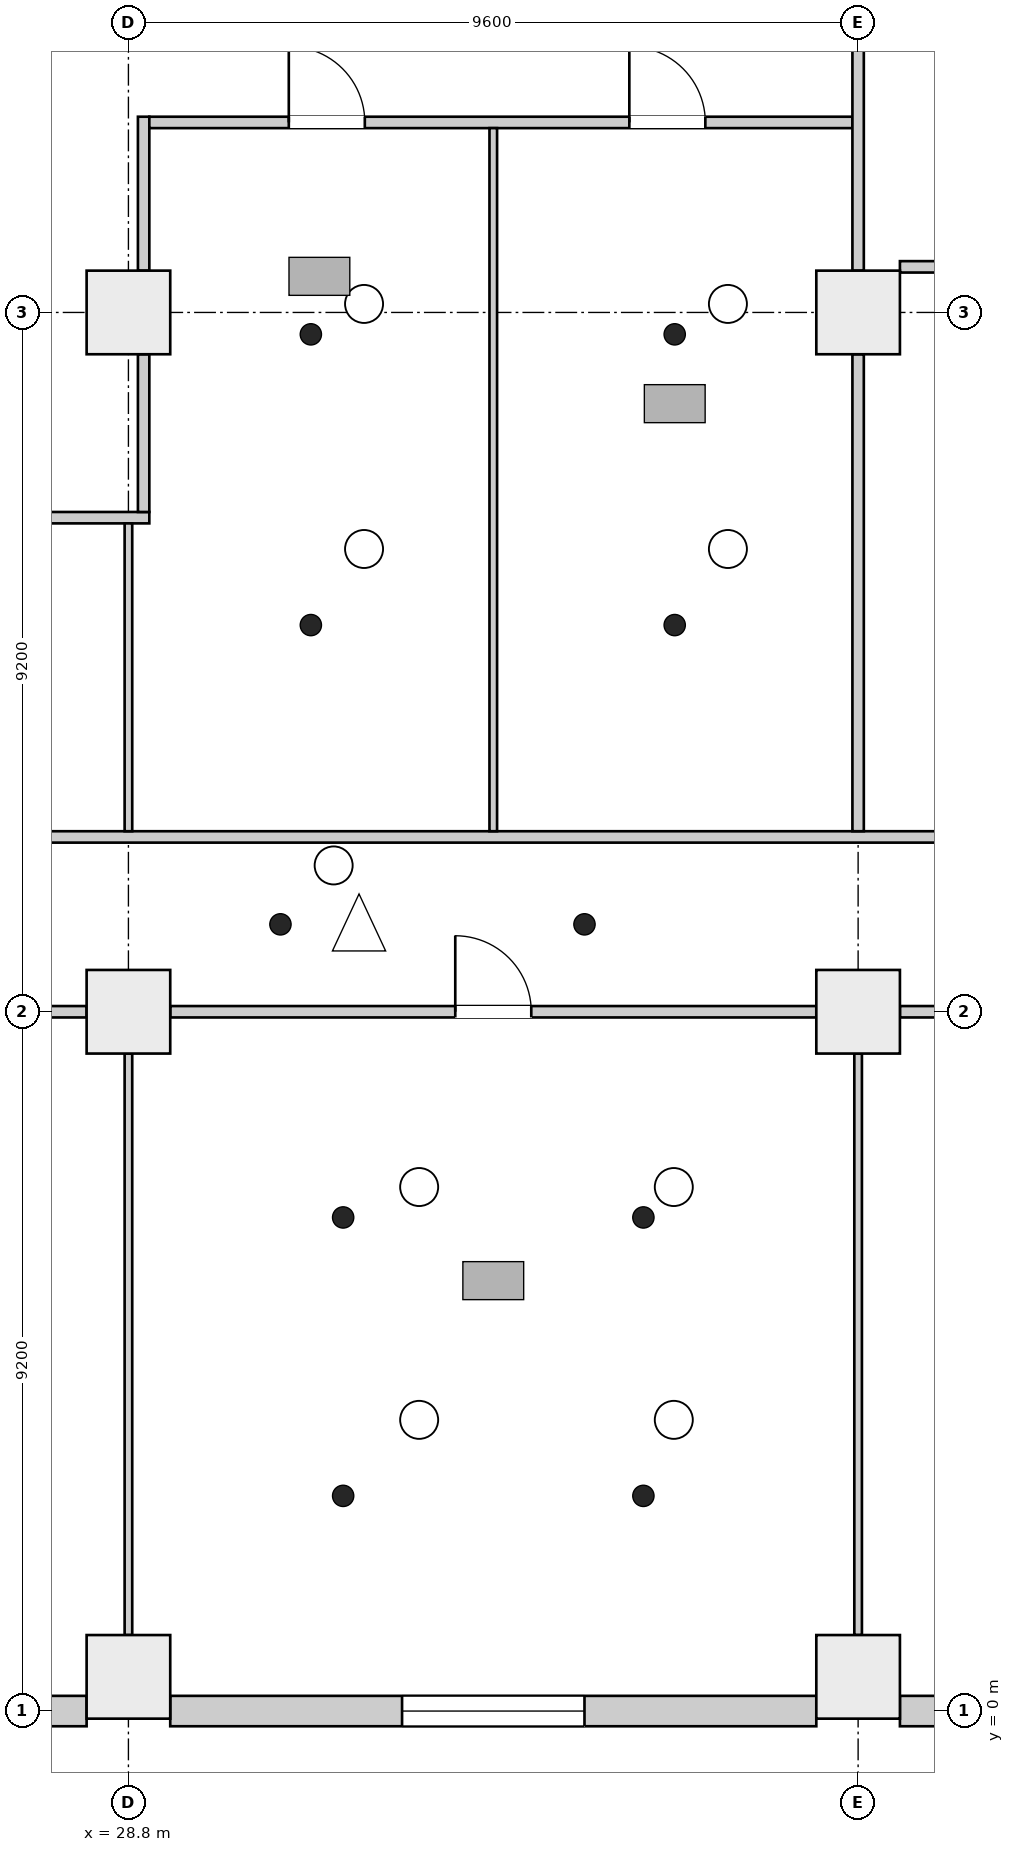
"""IFC4 building model, lengths in metres.
Left out: names, types, materials, properties, quantities, classifications, styles, units other than length and angle.
Written with IfcOpenShell. Run it as: python <this file> out.ifc"""

import sys

from ifc_helpers import new_model, si_unit, direction, frame, frame_2d, origin, origin_2d, place, context, subcontext, project, spatial, rectangle, extrude, element, fill, save


model = new_model("IFC4")
c1 = context("Model", 3, precision=1e-05, world=origin(), true_north=direction((0.0, 1.0)))
c2 = subcontext(c1, "Body", "Model", "MODEL_VIEW")
j1 = project(units=[si_unit("LENGTHUNIT", "METRE"), si_unit("PLANEANGLEUNIT", "RADIAN")], contexts=[c1])
p1 = place(None, origin())
s1 = spatial("IfcSite", under=j1, at=p1, CompositionType="ELEMENT")
p2 = place(p1, origin())
s2 = spatial("IfcBuilding", under=s1, at=p2, CompositionType="ELEMENT")
p3 = place(p2, frame((0.0, 0.0, 26.7)))
s3 = spatial("IfcBuildingStorey", under=s2, at=p3, CompositionType="ELEMENT", Elevation=26.7)
for number, where, z_axis, x_axis in (
    (1, (28.8, 0.45, 0.0), (0.0, 0.0, 1.0), (1.0, 0.0, 0.0)),
    (2, (38.4, 0.45, 0.0), (0.0, 0.0, 1.0), (1.0, 0.0, 0.0)),
    (3, (28.8, 9.2, 0.0), (0.0, 0.0, 1.0), (1.0, 0.0, 0.0)),
    (4, (38.4, 9.2, 0.0), (0.0, 0.0, 1.0), (1.0, 0.0, 0.0)),
    (5, (28.8, 18.4, 0.0), (0.0, 0.0, 1.0), (1.0, 0.0, 0.0)),
    (6, (38.4, 18.4, 0.0), (0.0, 0.0, 1.0), (1.0, 0.0, 0.0)),
):
    element("IfcColumn", number, at=place(p3, frame(where, z_axis=z_axis, x_axis=x_axis)), inside=s3, PredefinedType="COLUMN", context=c2, shape_type="SweptSolid", body=[
        extrude(rectangle(XDim=1.1, YDim=1.1, at=origin_2d()), origin(), (0.0, 0.0, 1.0), 5.2),
    ])
p4 = place(p3, frame((19.75, 0.0, 0.0), z_axis=(0.0, 0.0, 1.0), x_axis=(1.0, 0.0, 0.0)))
e7 = element("IfcWall", 7, at=p4, inside=s3, PredefinedType="ELEMENTEDWALL", context=c2, shape_type="SweptSolid", body=[
    extrude(rectangle(XDim=8.5, YDim=0.4, at=frame_2d((4.25, 0.0))), origin(), (0.0, 0.0, 1.0), 4.85),
])
p5 = place(p4, frame((3.05, 0.0, 1.0)))
e8 = element("IfcOpeningElement", 8, at=p5, cuts=e7, PredefinedType="OPENING", context=c2, shape_type="SweptSolid", body=[
    extrude(rectangle(XDim=2.4, YDim=2.2, at=frame_2d((1.2, 1.1))), frame((0.0, 0.21, 0.0), z_axis=(0.0, -1.0, 0.0), x_axis=(1.0, 0.0, 0.0)), (0.0, 0.0, 1.0), 0.42),
])
p6 = place(p3, frame((29.35, 0.0, 0.0), z_axis=(0.0, 0.0, 1.0), x_axis=(1.0, 0.0, 0.0)))
e9 = element("IfcWall", 9, at=p6, inside=s3, PredefinedType="ELEMENTEDWALL", context=c2, shape_type="SweptSolid", body=[
    extrude(rectangle(XDim=8.5, YDim=0.4, at=frame_2d((4.25, 0.0))), origin(), (0.0, 0.0, 1.0), 4.85),
])
p7 = place(p6, frame((3.05, 0.0, 1.0)))
e10 = element("IfcOpeningElement", 10, at=p7, cuts=e9, PredefinedType="OPENING", context=c2, shape_type="SweptSolid", body=[
    extrude(rectangle(XDim=2.4, YDim=2.2, at=frame_2d((1.2, 1.1))), frame((0.0, 0.21, 0.0), z_axis=(0.0, -1.0, 0.0), x_axis=(1.0, 0.0, 0.0)), (0.0, 0.0, 1.0), 0.42),
])
p8 = place(p3, frame((38.95, 0.0, 0.0), z_axis=(0.0, 0.0, 1.0), x_axis=(1.0, 0.0, 0.0)))
e11 = element("IfcWall", 11, at=p8, inside=s3, PredefinedType="ELEMENTEDWALL", context=c2, shape_type="SweptSolid", body=[
    extrude(rectangle(XDim=8.5, YDim=0.4, at=frame_2d((4.25, 0.0))), origin(), (0.0, 0.0, 1.0), 4.85),
])
p9 = place(p8, frame((3.05, 0.0, 1.0)))
e12 = element("IfcOpeningElement", 12, at=p9, cuts=e11, PredefinedType="OPENING", context=c2, shape_type="SweptSolid", body=[
    extrude(rectangle(XDim=2.4, YDim=2.2, at=frame_2d((1.2, 1.1))), frame((0.0, 0.21, 0.0), z_axis=(0.0, -1.0, 0.0), x_axis=(1.0, 0.0, 0.0)), (0.0, 0.0, 1.0), 0.42),
])
p10 = place(p3, frame((19.75, 9.2, 0.0), z_axis=(0.0, 0.0, 1.0), x_axis=(1.0, 0.0, 0.0)))
e13 = element("IfcWall", 13, at=p10, inside=s3, PredefinedType="PARTITIONING", context=c2, shape_type="SweptSolid", body=[
    extrude(rectangle(XDim=8.5, YDim=0.15, at=frame_2d((4.25, 0.0))), origin(), (0.0, 0.0, 1.0), 4.45),
])
p11 = place(p10, frame((3.75, 0.0, 0.0)))
e14 = element("IfcOpeningElement", 14, at=p11, cuts=e13, PredefinedType="OPENING", context=c2, shape_type="SweptSolid", body=[
    extrude(rectangle(XDim=1.0, YDim=2.1, at=frame_2d((0.5, 1.05))), frame((0.0, 0.085, 0.0), z_axis=(0.0, -1.0, 0.0), x_axis=(1.0, 0.0, 0.0)), (0.0, 0.0, 1.0), 0.17),
])
p12 = place(p3, frame((27.206, 11.5, 0.0), z_axis=(0.0, 0.0, 1.0), x_axis=(1.0, 0.0, 0.0)))
e15 = element("IfcWall", 15, at=p12, inside=s3, PredefinedType="PARTITIONING", context=c2, shape_type="SweptSolid", body=[
    extrude(rectangle(XDim=25.669, YDim=0.15, at=frame_2d((12.834, 0.0))), origin(), (0.0, 0.0, 1.0), 4.85),
])
p13 = place(p12, frame((13.094, 0.0, 0.0)))
e16 = element("IfcOpeningElement", 16, at=p13, cuts=e15, PredefinedType="OPENING", context=c2, shape_type="SweptSolid", body=[
    extrude(rectangle(XDim=1.0, YDim=2.1, at=frame_2d((0.5, 1.05))), frame((0.0, 0.085, 0.0), z_axis=(0.0, -1.0, 0.0), x_axis=(1.0, 0.0, 0.0)), (0.0, 0.0, 1.0), 0.17),
])
p14 = place(p12, frame((17.894, 0.0, 0.0)))
e17 = element("IfcOpeningElement", 17, at=p14, cuts=e15, PredefinedType="OPENING", context=c2, shape_type="SweptSolid", body=[
    extrude(rectangle(XDim=1.0, YDim=2.1, at=frame_2d((0.5, 1.05))), frame((0.0, 0.085, 0.0), z_axis=(0.0, -1.0, 0.0), x_axis=(1.0, 0.0, 0.0)), (0.0, 0.0, 1.0), 0.17),
])
p15 = place(p12, frame((22.659, 0.0, 0.0)))
e18 = element("IfcOpeningElement", 18, at=p15, cuts=e15, PredefinedType="OPENING", context=c2, shape_type="SweptSolid", body=[
    extrude(rectangle(XDim=1.0, YDim=2.1, at=frame_2d((0.5, 1.05))), frame((0.0, 0.085, 0.0), z_axis=(0.0, -1.0, 0.0), x_axis=(1.0, 0.0, 0.0)), (0.0, 0.0, 1.0), 0.17),
])
p16 = place(p3, frame((27.206, 15.7, 0.0), z_axis=(0.0, 0.0, 1.0), x_axis=(1.0, 0.0, 0.0)))
e19 = element("IfcWall", 19, at=p16, inside=s3, PredefinedType="PARTITIONING", context=c2, shape_type="SweptSolid", body=[
    extrude(rectangle(XDim=1.869, YDim=0.15, at=frame_2d((0.935, 0.0))), origin(), (0.0, 0.0, 1.0), 4.85),
])
p17 = place(p3, frame((28.8, 1.0, 0.0), z_axis=(0.0, 0.0, 1.0), x_axis=(0.0, 1.0, 0.0)))
e20 = element("IfcWall", 20, at=p17, inside=s3, PredefinedType="PARTITIONING", context=c2, shape_type="SweptSolid", body=[
    extrude(rectangle(XDim=7.65, YDim=0.1, at=frame_2d((3.825, 0.0))), origin(), (0.0, 0.0, 1.0), 4.45),
])
p18 = place(p3, frame((28.8, 11.575, 0.0), z_axis=(0.0, 0.0, 1.0), x_axis=(0.0, 1.0, 0.0)))
e21 = element("IfcWall", 21, at=p18, inside=s3, PredefinedType="PARTITIONING", context=c2, shape_type="SweptSolid", body=[
    extrude(rectangle(XDim=4.05, YDim=0.1, at=frame_2d((2.025, 0.0))), origin(), (0.0, 0.0, 1.0), 4.45),
])
p19 = place(p3, frame((29.0, 15.775, 0.0), z_axis=(0.0, 0.0, 1.0), x_axis=(0.0, 1.0, 0.0)))
e22 = element("IfcWall", 22, at=p19, inside=s3, PredefinedType="PARTITIONING", context=c2, shape_type="SweptSolid", body=[
    extrude(rectangle(XDim=2.075, YDim=0.15, at=frame_2d((1.038, 0.0))), origin(), (0.0, 0.0, 1.0), 4.45),
])
p20 = place(p3, frame((29.0, 18.95, 0.0), z_axis=(0.0, 0.0, 1.0), x_axis=(0.0, 1.0, 0.0)))
e23 = element("IfcWall", 23, at=p20, inside=s3, PredefinedType="PARTITIONING", context=c2, shape_type="SweptSolid", body=[
    extrude(rectangle(XDim=2.025, YDim=0.15, at=frame_2d((1.013, 0.0))), origin(), (0.0, 0.0, 1.0), 4.45),
])
p21 = place(p3, frame((29.075, 20.9, 0.0), z_axis=(0.0, 0.0, 1.0), x_axis=(1.0, 0.0, 0.0)))
e24 = element("IfcWall", 24, at=p21, inside=s3, PredefinedType="PARTITIONING", context=c2, shape_type="SweptSolid", body=[
    extrude(rectangle(XDim=9.25, YDim=0.15, at=frame_2d((4.625, 0.0))), origin(), (0.0, 0.0, 1.0), 4.85),
])
p22 = place(p21, frame((1.835, 0.0, 0.0)))
e25 = element("IfcOpeningElement", 25, at=p22, cuts=e24, PredefinedType="OPENING", context=c2, shape_type="SweptSolid", body=[
    extrude(rectangle(XDim=1.0, YDim=2.1, at=frame_2d((0.5, 1.05))), frame((0.0, 0.085, 0.0), z_axis=(0.0, -1.0, 0.0), x_axis=(1.0, 0.0, 0.0)), (0.0, 0.0, 1.0), 0.17),
])
p23 = place(p21, frame((6.315, 0.0, 0.0)))
e26 = element("IfcOpeningElement", 26, at=p23, cuts=e24, PredefinedType="OPENING", context=c2, shape_type="SweptSolid", body=[
    extrude(rectangle(XDim=1.0, YDim=2.1, at=frame_2d((0.5, 1.05))), frame((0.0, 0.085, 0.0), z_axis=(0.0, -1.0, 0.0), x_axis=(1.0, 0.0, 0.0)), (0.0, 0.0, 1.0), 0.17),
])
p24 = place(p3, frame((29.35, 9.2, 0.0), z_axis=(0.0, 0.0, 1.0), x_axis=(1.0, 0.0, 0.0)))
e27 = element("IfcWall", 27, at=p24, inside=s3, PredefinedType="PARTITIONING", context=c2, shape_type="SweptSolid", body=[
    extrude(rectangle(XDim=8.5, YDim=0.15, at=frame_2d((4.25, 0.0))), origin(), (0.0, 0.0, 1.0), 4.45),
])
p25 = place(p24, frame((3.75, 0.0, 0.0)))
e28 = element("IfcOpeningElement", 28, at=p25, cuts=e27, PredefinedType="OPENING", context=c2, shape_type="SweptSolid", body=[
    extrude(rectangle(XDim=1.0, YDim=2.1, at=frame_2d((0.5, 1.05))), frame((0.0, 0.085, 0.0), z_axis=(0.0, -1.0, 0.0), x_axis=(1.0, 0.0, 0.0)), (0.0, 0.0, 1.0), 0.17),
])
p26 = place(p3, frame((33.6, 11.575, 0.0), z_axis=(0.0, 0.0, 1.0), x_axis=(0.0, 1.0, 0.0)))
e29 = element("IfcWall", 29, at=p26, inside=s3, PredefinedType="PARTITIONING", context=c2, shape_type="SweptSolid", body=[
    extrude(rectangle(XDim=9.25, YDim=0.1, at=frame_2d((4.625, 0.0))), origin(), (0.0, 0.0, 1.0), 4.85),
])
p27 = place(p3, frame((38.4, 11.575, 0.0), z_axis=(0.0, 0.0, 1.0), x_axis=(0.0, 1.0, 0.0)))
e30 = element("IfcWall", 30, at=p27, inside=s3, PredefinedType="PARTITIONING", context=c2, shape_type="SweptSolid", body=[
    extrude(rectangle(XDim=6.275, YDim=0.15, at=frame_2d((3.138, 0.0))), origin(), (0.0, 0.0, 1.0), 4.45),
])
p28 = place(p3, frame((38.4, 18.95, 0.0), z_axis=(0.0, 0.0, 1.0), x_axis=(0.0, 1.0, 0.0)))
e31 = element("IfcWall", 31, at=p28, inside=s3, PredefinedType="PARTITIONING", context=c2, shape_type="SweptSolid", body=[
    extrude(rectangle(XDim=8.1, YDim=0.15, at=frame_2d((4.05, 0.0))), origin(), (0.0, 0.0, 1.0), 4.45),
])
p29 = place(p28, frame((3.55, 0.0, 0.0)))
e32 = element("IfcOpeningElement", 32, at=p29, cuts=e31, PredefinedType="OPENING", context=c2, shape_type="SweptSolid", body=[
    extrude(rectangle(XDim=1.0, YDim=2.1, at=frame_2d((0.5, 1.05))), frame((0.0, 0.085, 0.0), z_axis=(0.0, -1.0, 0.0), x_axis=(1.0, 0.0, 0.0)), (0.0, 0.0, 1.0), 0.17),
])
p30 = place(p3, frame((38.4, 1.0, 0.0), z_axis=(0.0, 0.0, 1.0), x_axis=(0.0, 1.0, 0.0)))
e33 = element("IfcWall", 33, at=p30, inside=s3, PredefinedType="PARTITIONING", context=c2, shape_type="SweptSolid", body=[
    extrude(rectangle(XDim=7.65, YDim=0.1, at=frame_2d((3.825, 0.0))), origin(), (0.0, 0.0, 1.0), 4.45),
])
p31 = place(p3, frame((38.95, 9.2, 0.0), z_axis=(0.0, 0.0, 1.0), x_axis=(1.0, 0.0, 0.0)))
e34 = element("IfcWall", 34, at=p31, inside=s3, PredefinedType="PARTITIONING", context=c2, shape_type="SweptSolid", body=[
    extrude(rectangle(XDim=8.5, YDim=0.15, at=frame_2d((4.25, 0.0))), origin(), (0.0, 0.0, 1.0), 4.45),
])
p32 = place(p31, frame((3.75, 0.0, 0.0)))
e35 = element("IfcOpeningElement", 35, at=p32, cuts=e34, PredefinedType="OPENING", context=c2, shape_type="SweptSolid", body=[
    extrude(rectangle(XDim=1.0, YDim=2.1, at=frame_2d((0.5, 1.05))), frame((0.0, 0.085, 0.0), z_axis=(0.0, -1.0, 0.0), x_axis=(1.0, 0.0, 0.0)), (0.0, 0.0, 1.0), 0.17),
])
p33 = place(p3, frame((38.95, 19.0, 0.0), z_axis=(0.0, 0.0, 1.0), x_axis=(1.0, 0.0, 0.0)))
e36 = element("IfcWall", 36, at=p33, inside=s3, PredefinedType="PARTITIONING", context=c2, shape_type="SweptSolid", body=[
    extrude(rectangle(XDim=8.5, YDim=0.15, at=frame_2d((4.25, 0.0))), origin(), (0.0, 0.0, 1.0), 4.85),
])
p34 = place(p7, origin())
e37 = element("IfcWindow", 37, at=p34, inside=s3, PartitioningType="SINGLE_PANEL", PredefinedType="WINDOW", context=c2, shape_type="SweptSolid", body=[
    extrude(rectangle(XDim=2.4, YDim=2.2, at=frame_2d((1.2, 1.1))), frame((0.0, 0.03, 0.0), z_axis=(0.0, -1.0, 0.0), x_axis=(1.0, 0.0, 0.0)), (0.0, 0.0, 1.0), 0.06),
])
fill(e10, e37)
p35 = place(p22, origin())
e38 = element("IfcDoor", 38, at=p35, inside=s3, OperationType="SINGLE_SWING_RIGHT", PredefinedType="DOOR", context=c2, shape_type="SweptSolid", body=[
    extrude(rectangle(XDim=1.0, YDim=2.1, at=frame_2d((0.5, 1.05))), frame((0.0, 0.025, 0.0), z_axis=(0.0, -1.0, 0.0), x_axis=(1.0, 0.0, 0.0)), (0.0, 0.0, 1.0), 0.05),
])
fill(e25, e38)
p36 = place(p23, origin())
e39 = element("IfcDoor", 39, at=p36, inside=s3, OperationType="SINGLE_SWING_LEFT", PredefinedType="DOOR", context=c2, shape_type="SweptSolid", body=[
    extrude(rectangle(XDim=1.0, YDim=2.1, at=frame_2d((0.5, 1.05))), frame((0.0, 0.025, 0.0), z_axis=(0.0, -1.0, 0.0), x_axis=(1.0, 0.0, 0.0)), (0.0, 0.0, 1.0), 0.05),
])
fill(e26, e39)
p37 = place(p25, origin())
e40 = element("IfcDoor", 40, at=p37, inside=s3, OperationType="SINGLE_SWING_RIGHT", PredefinedType="DOOR", context=c2, shape_type="SweptSolid", body=[
    extrude(rectangle(XDim=1.0, YDim=2.1, at=frame_2d((0.5, 1.05))), frame((0.0, 0.025, 0.0), z_axis=(0.0, -1.0, 0.0), x_axis=(1.0, 0.0, 0.0)), (0.0, 0.0, 1.0), 0.05),
])
fill(e28, e40)
save(model, sys.argv[1])
